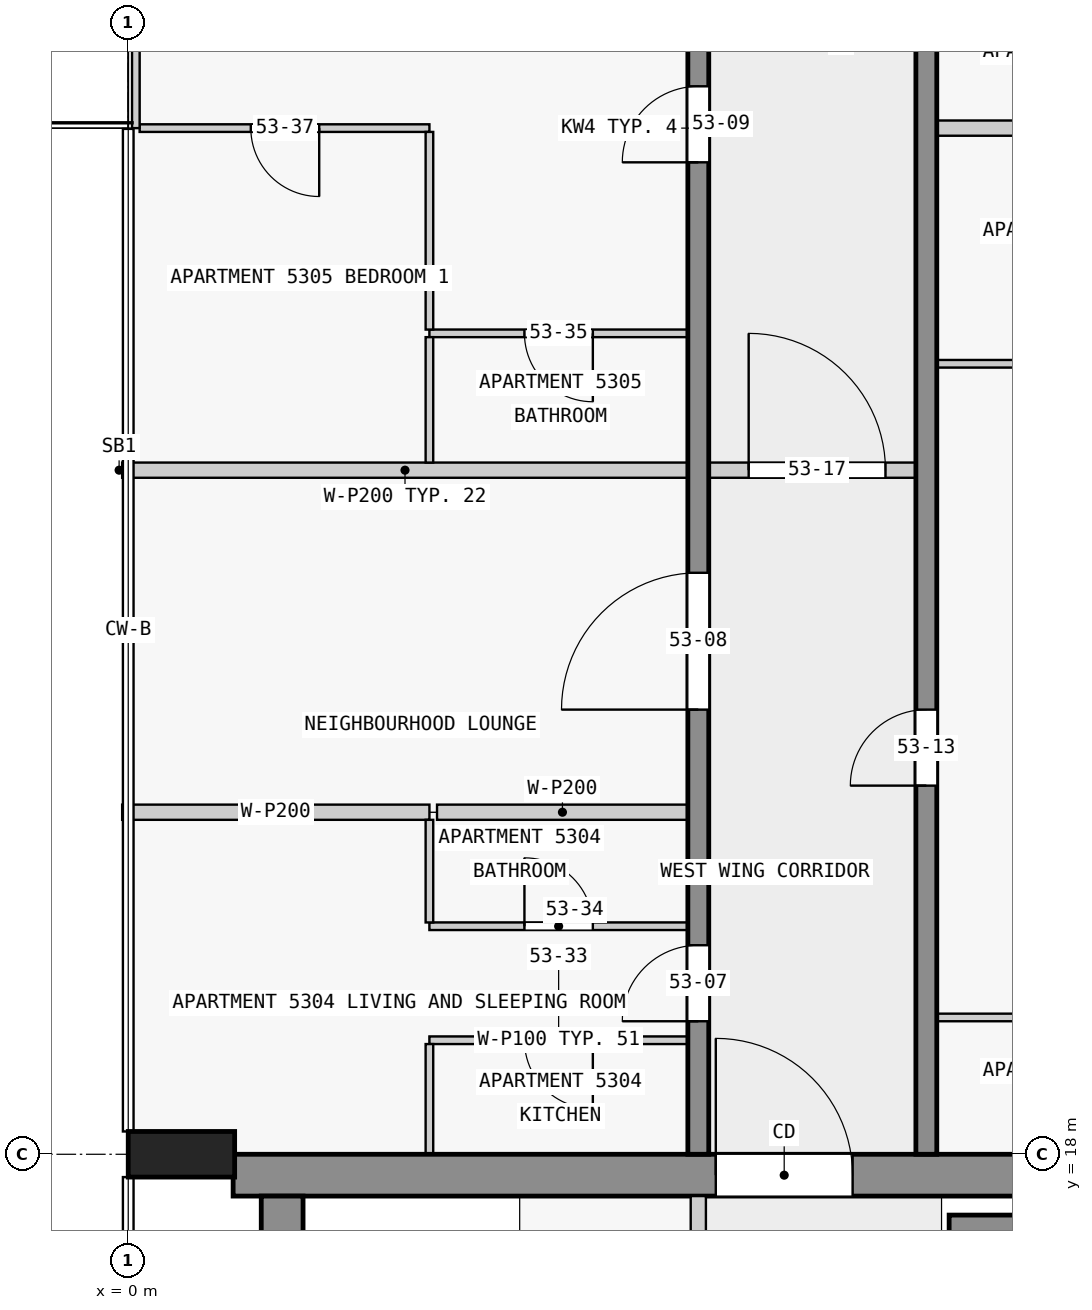
"""IFC4 building model, lengths in metres.
Left out: names, types, materials, properties, quantities, classifications, styles, units other than length and angle.
Written with IfcOpenShell. Run it as: python <this file> out.ifc"""

import sys

from ifc_helpers import new_model, si_unit, direction, frame, frame_2d, origin, origin_2d, place, context, subcontext, project, spatial, rectangle, extrude, element, fill, save


model = new_model("IFC4")
c1 = context("Model", 3, precision=1e-05, world=origin(), true_north=direction((0.0, 1.0)))
c2 = subcontext(c1, "Body", "Model", "MODEL_VIEW")
j1 = project(units=[si_unit("LENGTHUNIT", "METRE"), si_unit("PLANEANGLEUNIT", "RADIAN")], contexts=[c1])
p1 = place(None, origin())
s1 = spatial("IfcSite", under=j1, at=p1, CompositionType="ELEMENT")
p2 = place(p1, origin())
s2 = spatial("IfcBuilding", under=s1, at=p2, CompositionType="ELEMENT")
p3 = place(p2, frame((0.0, 0.0, 204.9)))
s3 = spatial("IfcBuildingStorey", under=s2, at=p3, CompositionType="ELEMENT", Elevation=204.9)
p4 = place(p3, frame((0.7, 18.0, 0.0), z_axis=(0.0, 0.0, 1.0), x_axis=(0.0, 1.0, 0.0)))
e1 = element("IfcColumn", 1, at=p4, inside=s3, PredefinedType="COLUMN", context=c2, shape_type="SweptSolid", body=[
    extrude(rectangle(XDim=0.6, YDim=1.4, at=origin_2d()), origin(), (0.0, 0.0, 1.0), 3.5),
])
p5 = place(p3, frame((1.38, 17.725, 0.0), z_axis=(0.0, 0.0, 1.0), x_axis=(1.0, 0.0, 0.0)))
e2 = element("IfcWall", 2, at=p5, inside=s3, PredefinedType="SHEAR", context=c2, shape_type="SweptSolid", body=[
    extrude(rectangle(XDim=21.12, YDim=0.55, at=frame_2d((10.56, 0.0))), origin(), (0.0, 0.0, 1.0), 3.25),
])
p6 = place(p5, frame((6.35, 0.0, 0.0)))
e3 = element("IfcOpeningElement", 3, at=p6, cuts=e2, PredefinedType="OPENING", context=c2, shape_type="SweptSolid", body=[
    extrude(rectangle(XDim=1.8, YDim=2.1, at=frame_2d((0.9, 1.05))), frame((0.0, 0.285, 0.0), z_axis=(0.0, -1.0, 0.0), x_axis=(1.0, 0.0, 0.0)), (0.0, 0.0, 1.0), 0.57),
])
p7 = place(p3, frame((2.025, 2.5, 0.0), z_axis=(0.0, 0.0, 1.0), x_axis=(0.0, 1.0, 0.0)))
e4 = element("IfcWall", 4, at=p7, inside=s3, PredefinedType="SHEAR", context=c2, shape_type="SweptSolid", body=[
    extrude(rectangle(XDim=14.95, YDim=0.55, at=frame_2d((7.475, 0.0))), origin(), (0.0, 0.0, 1.0), 3.25),
])
p8 = place(p3, frame((10.8, 17.05, 0.0), z_axis=(0.0, 0.0, 1.0), x_axis=(1.0, 0.0, 0.0)))
e5 = element("IfcWall", 5, at=p8, inside=s3, PredefinedType="SHEAR", context=c2, shape_type="SweptSolid", body=[
    extrude(rectangle(XDim=7.8, YDim=0.3, at=frame_2d((3.9, 0.0))), origin(), (0.0, 0.0, 1.0), 3.25),
])
p9 = place(p3, frame((7.5, 18.0, 0.0), z_axis=(0.0, 0.0, 1.0), x_axis=(0.0, 1.0, 0.0)))
e6 = element("IfcWall", 6, at=p9, inside=s3, PredefinedType="SHEAR", context=c2, shape_type="SweptSolid", body=[
    extrude(rectangle(XDim=27.0, YDim=0.275, at=frame_2d((13.5, 0.0))), origin(), (0.0, 0.0, 1.0), 3.25),
])
p10 = place(p9, frame((1.75, 0.0, 0.0)))
e7 = element("IfcOpeningElement", 7, at=p10, cuts=e6, PredefinedType="OPENING", context=c2, shape_type="SweptSolid", body=[
    extrude(rectangle(XDim=1.0, YDim=2.1, at=frame_2d((0.5, 1.05))), frame((0.0, 0.147, 0.0), z_axis=(0.0, -1.0, 0.0), x_axis=(1.0, 0.0, 0.0)), (0.0, 0.0, 1.0), 0.295),
])
p11 = place(p9, frame((5.85, 0.0, 0.0)))
e8 = element("IfcOpeningElement", 8, at=p11, cuts=e6, PredefinedType="OPENING", context=c2, shape_type="SweptSolid", body=[
    extrude(rectangle(XDim=1.8, YDim=2.1, at=frame_2d((0.9, 1.05))), frame((0.0, 0.147, 0.0), z_axis=(0.0, -1.0, 0.0), x_axis=(1.0, 0.0, 0.0)), (0.0, 0.0, 1.0), 0.295),
])
p12 = place(p9, frame((13.05, 0.0, 0.0)))
e9 = element("IfcOpeningElement", 9, at=p12, cuts=e6, PredefinedType="OPENING", context=c2, shape_type="SweptSolid", body=[
    extrude(rectangle(XDim=1.0, YDim=2.1, at=frame_2d((0.5, 1.05))), frame((0.0, 0.147, 0.0), z_axis=(0.0, -1.0, 0.0), x_axis=(1.0, 0.0, 0.0)), (0.0, 0.0, 1.0), 0.295),
])
p13 = place(p9, frame((19.75, 0.0, 0.0)))
e10 = element("IfcOpeningElement", 10, at=p13, cuts=e6, PredefinedType="OPENING", context=c2, shape_type="SweptSolid", body=[
    extrude(rectangle(XDim=1.0, YDim=2.1, at=frame_2d((0.5, 1.05))), frame((0.0, 0.147, 0.0), z_axis=(0.0, -1.0, 0.0), x_axis=(1.0, 0.0, 0.0)), (0.0, 0.0, 1.0), 0.295),
])
p14 = place(p9, frame((23.25, 0.0, 0.0)))
e11 = element("IfcOpeningElement", 11, at=p14, cuts=e6, PredefinedType="OPENING", context=c2, shape_type="SweptSolid", body=[
    extrude(rectangle(XDim=0.9, YDim=2.1, at=frame_2d((0.45, 1.05))), frame((0.0, 0.147, 0.0), z_axis=(0.0, -1.0, 0.0), x_axis=(1.0, 0.0, 0.0)), (0.0, 0.0, 1.0), 0.295),
])
p15 = place(p9, frame((25.45, 0.0, 0.0)))
e12 = element("IfcOpeningElement", 12, at=p15, cuts=e6, PredefinedType="OPENING", context=c2, shape_type="SweptSolid", body=[
    extrude(rectangle(XDim=1.0, YDim=2.1, at=frame_2d((0.5, 1.05))), frame((0.0, 0.147, 0.0), z_axis=(0.0, -1.0, 0.0), x_axis=(1.0, 0.0, 0.0)), (0.0, 0.0, 1.0), 0.295),
])
p16 = place(p3, frame((10.5, 18.0, 0.0), z_axis=(0.0, 0.0, 1.0), x_axis=(0.0, 1.0, 0.0)))
e13 = element("IfcWall", 13, at=p16, inside=s3, PredefinedType="SHEAR", context=c2, shape_type="SweptSolid", body=[
    extrude(rectangle(XDim=27.0, YDim=0.275, at=frame_2d((13.5, 0.0))), origin(), (0.0, 0.0, 1.0), 3.25),
])
p17 = place(p16, frame((4.85, 0.0, 0.0)))
e14 = element("IfcOpeningElement", 14, at=p17, cuts=e13, PredefinedType="OPENING", context=c2, shape_type="SweptSolid", body=[
    extrude(rectangle(XDim=1.0, YDim=2.1, at=frame_2d((0.5, 1.05))), frame((0.0, 0.147, 0.0), z_axis=(0.0, -1.0, 0.0), x_axis=(1.0, 0.0, 0.0)), (0.0, 0.0, 1.0), 0.295),
])
p18 = place(p16, frame((15.25, 0.0, 0.0)))
e15 = element("IfcOpeningElement", 15, at=p18, cuts=e13, PredefinedType="OPENING", context=c2, shape_type="SweptSolid", body=[
    extrude(rectangle(XDim=1.0, YDim=2.1, at=frame_2d((0.5, 1.05))), frame((0.0, 0.147, 0.0), z_axis=(0.0, -1.0, 0.0), x_axis=(1.0, 0.0, 0.0)), (0.0, 0.0, 1.0), 0.295),
])
p19 = place(p16, frame((21.35, 0.0, 0.0)))
e16 = element("IfcOpeningElement", 16, at=p19, cuts=e13, PredefinedType="OPENING", context=c2, shape_type="SweptSolid", body=[
    extrude(rectangle(XDim=1.0, YDim=2.1, at=frame_2d((0.5, 1.05))), frame((0.0, 0.147, 0.0), z_axis=(0.0, -1.0, 0.0), x_axis=(1.0, 0.0, 0.0)), (0.0, 0.0, 1.0), 0.295),
])
p20 = place(p3, frame((0.1, 31.5, 0.0), z_axis=(0.0, 0.0, 1.0), x_axis=(0.0, 1.0, 0.0)))
e17 = element("IfcWall", 17, at=p20, inside=s3, PredefinedType="STANDARD", context=c2, shape_type="SweptSolid", body=[
    extrude(rectangle(XDim=4.5, YDim=0.1, at=frame_2d((2.25, 0.0))), origin(), (0.0, 0.0, 1.0), 3.25),
])
p21 = place(p20, frame((1.05, 0.0, 0.0)))
e18 = element("IfcOpeningElement", 18, at=p21, cuts=e17, PredefinedType="OPENING", context=c2, shape_type="SweptSolid", body=[
    extrude(rectangle(XDim=2.4, YDim=2.4, at=frame_2d((1.2, 1.2))), frame((0.0, 0.06, 0.0), z_axis=(0.0, -1.0, 0.0), x_axis=(1.0, 0.0, 0.0)), (0.0, 0.0, 1.0), 0.12),
])
p22 = place(p3, frame((7.5, 10.1, 0.0), z_axis=(0.0, 0.0, 1.0), x_axis=(0.0, 1.0, 0.0)))
e19 = element("IfcWall", 19, at=p22, inside=s3, PredefinedType="PARTITIONING", context=c2, shape_type="SweptSolid", body=[
    extrude(rectangle(XDim=7.35, YDim=0.2, at=frame_2d((3.675, 0.0))), origin(), (0.0, 0.0, 1.0), 3.25),
])
p23 = place(p22, frame((0.75, 0.0, 0.0)))
e20 = element("IfcOpeningElement", 20, at=p23, cuts=e19, PredefinedType="OPENING", context=c2, shape_type="SweptSolid", body=[
    extrude(rectangle(XDim=0.9, YDim=2.1, at=frame_2d((0.45, 1.05))), frame((0.0, 0.11, 0.0), z_axis=(0.0, -1.0, 0.0), x_axis=(1.0, 0.0, 0.0)), (0.0, 0.0, 1.0), 0.22),
])
p24 = place(p22, frame((4.425, 0.0, 0.0)))
e21 = element("IfcOpeningElement", 21, at=p24, cuts=e19, PredefinedType="OPENING", context=c2, shape_type="SweptSolid", body=[
    extrude(rectangle(XDim=0.9, YDim=2.1, at=frame_2d((0.45, 1.05))), frame((0.0, 0.11, 0.0), z_axis=(0.0, -1.0, 0.0), x_axis=(1.0, 0.0, 0.0)), (0.0, 0.0, 1.0), 0.22),
])
p25 = place(p3, frame((7.363, 19.5, 0.0), z_axis=(0.0, 0.0, 1.0), x_axis=(-1.0, 0.0, 0.0)))
e22 = element("IfcWall", 22, at=p25, inside=s3, PredefinedType="PARTITIONING", context=c2, shape_type="SweptSolid", body=[
    extrude(rectangle(XDim=3.4, YDim=0.1, at=frame_2d((1.7, 0.0))), origin(), (0.0, 0.0, 1.0), 3.25),
])
p26 = place(p25, frame((1.25, 0.0, 0.0)))
e23 = element("IfcOpeningElement", 23, at=p26, cuts=e22, PredefinedType="OPENING", context=c2, shape_type="SweptSolid", body=[
    extrude(rectangle(XDim=0.9, YDim=2.1, at=frame_2d((0.45, 1.05))), frame((0.0, 0.06, 0.0), z_axis=(0.0, -1.0, 0.0), x_axis=(1.0, 0.0, 0.0)), (0.0, 0.0, 1.0), 0.12),
])
p27 = place(p3, frame((14.038, 19.8, 0.0), z_axis=(0.0, 0.0, 1.0), x_axis=(-1.0, 0.0, 0.0)))
e24 = element("IfcWall", 24, at=p27, inside=s3, PredefinedType="PARTITIONING", context=c2, shape_type="SweptSolid", body=[
    extrude(rectangle(XDim=3.4, YDim=0.1, at=frame_2d((1.7, 0.0))), origin(), (0.0, 0.0, 1.0), 3.25),
])
p28 = place(p27, frame((1.25, 0.0, 0.0)))
e25 = element("IfcOpeningElement", 25, at=p28, cuts=e24, PredefinedType="OPENING", context=c2, shape_type="SweptSolid", body=[
    extrude(rectangle(XDim=0.9, YDim=2.1, at=frame_2d((0.45, 1.05))), frame((0.0, 0.06, 0.0), z_axis=(0.0, -1.0, 0.0), x_axis=(1.0, 0.0, 0.0)), (0.0, 0.0, 1.0), 0.12),
])
p29 = place(p3, frame((3.962, 21.0, 0.0), z_axis=(0.0, 0.0, 1.0), x_axis=(1.0, 0.0, 0.0)))
e26 = element("IfcWall", 26, at=p29, inside=s3, PredefinedType="PARTITIONING", context=c2, shape_type="SweptSolid", body=[
    extrude(rectangle(XDim=3.4, YDim=0.1, at=frame_2d((1.7, 0.0))), origin(), (0.0, 0.0, 1.0), 3.25),
])
p30 = place(p29, frame((1.25, 0.0, 0.0)))
e27 = element("IfcOpeningElement", 27, at=p30, cuts=e26, PredefinedType="OPENING", context=c2, shape_type="SweptSolid", body=[
    extrude(rectangle(XDim=0.9, YDim=2.1, at=frame_2d((0.45, 1.05))), frame((0.0, 0.06, 0.0), z_axis=(0.0, -1.0, 0.0), x_axis=(1.0, 0.0, 0.0)), (0.0, 0.0, 1.0), 0.12),
])
p31 = place(p3, frame((7.363, 22.5, 0.0), z_axis=(0.0, 0.0, 1.0), x_axis=(-1.0, 0.0, 0.0)))
e28 = element("IfcWall", 28, at=p31, inside=s3, PredefinedType="PARTITIONING", context=c2, shape_type="SweptSolid", body=[
    extrude(rectangle(XDim=3.3, YDim=0.2, at=frame_2d((1.65, 0.0))), origin(), (0.0, 0.0, 1.0), 3.25),
])
p32 = place(p3, frame((-0.08, 22.5, 0.0), z_axis=(0.0, 0.0, 1.0), x_axis=(1.0, 0.0, 0.0)))
e29 = element("IfcWall", 29, at=p32, inside=s3, PredefinedType="PARTITIONING", context=c2, shape_type="SweptSolid", body=[
    extrude(rectangle(XDim=4.042, YDim=0.2, at=frame_2d((2.021, 0.0))), origin(), (0.0, 0.0, 1.0), 3.25),
])
p33 = place(p3, frame((7.363, 27.0, 0.0), z_axis=(0.0, 0.0, 1.0), x_axis=(-1.0, 0.0, 0.0)))
e30 = element("IfcWall", 30, at=p33, inside=s3, PredefinedType="PARTITIONING", context=c2, shape_type="SweptSolid", body=[
    extrude(rectangle(XDim=7.443, YDim=0.2, at=frame_2d((3.721, 0.0))), origin(), (0.0, 0.0, 1.0), 3.25),
])
p34 = place(p3, frame((10.637, 28.4, 0.0), z_axis=(0.0, 0.0, 1.0), x_axis=(1.0, 0.0, 0.0)))
e31 = element("IfcWall", 31, at=p34, inside=s3, PredefinedType="PARTITIONING", context=c2, shape_type="SweptSolid", body=[
    extrude(rectangle(XDim=3.35, YDim=0.1, at=frame_2d((1.675, 0.0))), origin(), (0.0, 0.0, 1.0), 3.25),
])
p35 = place(p34, frame((1.25, 0.0, 0.0)))
e32 = element("IfcOpeningElement", 32, at=p35, cuts=e31, PredefinedType="OPENING", context=c2, shape_type="SweptSolid", body=[
    extrude(rectangle(XDim=0.9, YDim=2.1, at=frame_2d((0.45, 1.05))), frame((0.0, 0.06, 0.0), z_axis=(0.0, -1.0, 0.0), x_axis=(1.0, 0.0, 0.0)), (0.0, 0.0, 1.0), 0.12),
])
p36 = place(p3, frame((7.363, 28.8, 0.0), z_axis=(0.0, 0.0, 1.0), x_axis=(-1.0, 0.0, 0.0)))
e33 = element("IfcWall", 33, at=p36, inside=s3, PredefinedType="PARTITIONING", context=c2, shape_type="SweptSolid", body=[
    extrude(rectangle(XDim=3.4, YDim=0.1, at=frame_2d((1.7, 0.0))), origin(), (0.0, 0.0, 1.0), 3.25),
])
p37 = place(p36, frame((1.25, 0.0, 0.0)))
e34 = element("IfcOpeningElement", 34, at=p37, cuts=e33, PredefinedType="OPENING", context=c2, shape_type="SweptSolid", body=[
    extrude(rectangle(XDim=0.9, YDim=2.1, at=frame_2d((0.45, 1.05))), frame((0.0, 0.06, 0.0), z_axis=(0.0, -1.0, 0.0), x_axis=(1.0, 0.0, 0.0)), (0.0, 0.0, 1.0), 0.12),
])
p38 = place(p3, frame((3.962, 31.5, 0.0), z_axis=(0.0, 0.0, 1.0), x_axis=(-1.0, 0.0, 0.0)))
e35 = element("IfcWall", 35, at=p38, inside=s3, PredefinedType="PARTITIONING", context=c2, shape_type="SweptSolid", body=[
    extrude(rectangle(XDim=3.812, YDim=0.1, at=frame_2d((1.906, 0.0))), origin(), (0.0, 0.0, 1.0), 3.25),
])
p39 = place(p38, frame((1.45, 0.0, 0.0)))
e36 = element("IfcOpeningElement", 36, at=p39, cuts=e35, PredefinedType="OPENING", context=c2, shape_type="SweptSolid", body=[
    extrude(rectangle(XDim=0.9, YDim=2.1, at=frame_2d((0.45, 1.05))), frame((0.0, 0.06, 0.0), z_axis=(0.0, -1.0, 0.0), x_axis=(1.0, 0.0, 0.0)), (0.0, 0.0, 1.0), 0.12),
])
p40 = place(p3, frame((17.85, 31.5, 0.0), z_axis=(0.0, 0.0, 1.0), x_axis=(-1.0, 0.0, 0.0)))
e37 = element("IfcWall", 37, at=p40, inside=s3, PredefinedType="PARTITIONING", context=c2, shape_type="SweptSolid", body=[
    extrude(rectangle(XDim=7.213, YDim=0.2, at=frame_2d((3.606, 0.0))), origin(), (0.0, 0.0, 1.0), 3.25),
])
p41 = place(p3, frame((3.962, 19.45, 0.0), z_axis=(0.0, 0.0, 1.0), x_axis=(0.0, -1.0, 0.0)))
e38 = element("IfcWall", 38, at=p41, inside=s3, PredefinedType="PARTITIONING", context=c2, shape_type="SweptSolid", body=[
    extrude(rectangle(XDim=1.45, YDim=0.1, at=frame_2d((0.725, 0.0))), origin(), (0.0, 0.0, 1.0), 3.25),
])
p42 = place(p3, frame((3.962, 22.4, 0.0), z_axis=(0.0, 0.0, 1.0), x_axis=(0.0, -1.0, 0.0)))
e39 = element("IfcWall", 39, at=p42, inside=s3, PredefinedType="PARTITIONING", context=c2, shape_type="SweptSolid", body=[
    extrude(rectangle(XDim=1.35, YDim=0.1, at=frame_2d((0.675, 0.0))), origin(), (0.0, 0.0, 1.0), 3.25),
])
p43 = place(p3, frame((3.962, 28.75, 0.0), z_axis=(0.0, 0.0, 1.0), x_axis=(0.0, -1.0, 0.0)))
e40 = element("IfcWall", 40, at=p43, inside=s3, PredefinedType="PARTITIONING", context=c2, shape_type="SweptSolid", body=[
    extrude(rectangle(XDim=1.65, YDim=0.1, at=frame_2d((0.825, 0.0))), origin(), (0.0, 0.0, 1.0), 3.25),
])
p44 = place(p3, frame((3.962, 28.85, 0.0), z_axis=(0.0, 0.0, 1.0), x_axis=(0.0, 1.0, 0.0)))
e41 = element("IfcWall", 41, at=p44, inside=s3, PredefinedType="PARTITIONING", context=c2, shape_type="SweptSolid", body=[
    extrude(rectangle(XDim=2.6, YDim=0.1, at=frame_2d((1.3, 0.0))), origin(), (0.0, 0.0, 1.0), 3.25),
])
p45 = place(p3, frame((7.462, 27.0, 0.0), z_axis=(0.0, 0.0, 1.0), x_axis=(1.0, 0.0, 0.0)))
e42 = element("IfcWall", 42, at=p45, inside=s3, PredefinedType="PARTITIONING", context=c2, shape_type="SweptSolid", body=[
    extrude(rectangle(XDim=3.175, YDim=0.2, at=frame_2d((1.587, 0.0))), origin(), (0.0, 0.0, 1.0), 3.25),
])
p46 = place(p45, frame((0.7, 0.0, 0.0)))
e43 = element("IfcOpeningElement", 43, at=p46, cuts=e42, PredefinedType="OPENING", context=c2, shape_type="SweptSolid", body=[
    extrude(rectangle(XDim=1.8, YDim=2.1, at=frame_2d((0.9, 1.05))), frame((0.0, 0.11, 0.0), z_axis=(0.0, -1.0, 0.0), x_axis=(1.0, 0.0, 0.0)), (0.0, 0.0, 1.0), 0.22),
])
p47 = place(p6, origin())
e44 = element("IfcDoor", 44, at=p47, inside=s3, OperationType="DOUBLE_DOOR_SINGLE_SWING", PredefinedType="DOOR", context=c2, shape_type="SweptSolid", body=[
    extrude(rectangle(XDim=1.8, YDim=2.1, at=frame_2d((0.9, 1.05))), frame((0.0, 0.025, 0.0), z_axis=(0.0, -1.0, 0.0), x_axis=(1.0, 0.0, 0.0)), (0.0, 0.0, 1.0), 0.05),
])
fill(e3, e44)
p48 = place(p10, origin())
e45 = element("IfcDoor", 45, at=p48, inside=s3, OperationType="SINGLE_SWING_LEFT", PredefinedType="DOOR", context=c2, shape_type="SweptSolid", body=[
    extrude(rectangle(XDim=1.0, YDim=2.1, at=frame_2d((0.5, 1.05))), frame((0.0, 0.025, 0.0), z_axis=(0.0, -1.0, 0.0), x_axis=(1.0, 0.0, 0.0)), (0.0, 0.0, 1.0), 0.05),
])
fill(e7, e45)
p49 = place(p11, origin())
e46 = element("IfcDoor", 46, at=p49, inside=s3, OperationType="SINGLE_SWING_LEFT", PredefinedType="DOOR", context=c2, shape_type="SweptSolid", body=[
    extrude(rectangle(XDim=1.8, YDim=2.1, at=frame_2d((0.9, 1.05))), frame((0.0, 0.025, 0.0), z_axis=(0.0, -1.0, 0.0), x_axis=(1.0, 0.0, 0.0)), (0.0, 0.0, 1.0), 0.05),
])
fill(e8, e46)
p50 = place(p12, origin())
e47 = element("IfcDoor", 47, at=p50, inside=s3, OperationType="SINGLE_SWING_RIGHT", PredefinedType="DOOR", context=c2, shape_type="SweptSolid", body=[
    extrude(rectangle(XDim=1.0, YDim=2.1, at=frame_2d((0.5, 1.05))), frame((0.0, 0.025, 0.0), z_axis=(0.0, -1.0, 0.0), x_axis=(1.0, 0.0, 0.0)), (0.0, 0.0, 1.0), 0.05),
])
fill(e9, e47)
p51 = place(p17, origin())
e48 = element("IfcDoor", 48, at=p51, inside=s3, OperationType="SINGLE_SWING_LEFT", PredefinedType="DOOR", context=c2, shape_type="SweptSolid", body=[
    extrude(rectangle(XDim=1.0, YDim=2.1, at=frame_2d((0.5, 1.05))), frame((0.0, 0.025, 0.0), z_axis=(0.0, -1.0, 0.0), x_axis=(1.0, 0.0, 0.0)), (0.0, 0.0, 1.0), 0.05),
])
fill(e14, e48)
p52 = place(p46, origin())
e49 = element("IfcDoor", 49, at=p52, inside=s3, OperationType="SINGLE_SWING_RIGHT", PredefinedType="DOOR", context=c2, shape_type="SweptSolid", body=[
    extrude(rectangle(XDim=1.8, YDim=2.1, at=frame_2d((0.9, 1.05))), frame((0.0, 0.025, 0.0), z_axis=(0.0, -1.0, 0.0), x_axis=(1.0, 0.0, 0.0)), (0.0, 0.0, 1.0), 0.05),
])
fill(e43, e49)
p53 = place(p26, origin())
e50 = element("IfcDoor", 50, at=p53, inside=s3, OperationType="SINGLE_SWING_LEFT", PredefinedType="DOOR", context=c2, shape_type="SweptSolid", body=[
    extrude(rectangle(XDim=0.9, YDim=2.1, at=frame_2d((0.45, 1.05))), frame((0.0, 0.025, 0.0), z_axis=(0.0, -1.0, 0.0), x_axis=(1.0, 0.0, 0.0)), (0.0, 0.0, 1.0), 0.05),
])
fill(e23, e50)
p54 = place(p30, origin())
e51 = element("IfcDoor", 51, at=p54, inside=s3, OperationType="SINGLE_SWING_LEFT", PredefinedType="DOOR", context=c2, shape_type="SweptSolid", body=[
    extrude(rectangle(XDim=0.9, YDim=2.1, at=frame_2d((0.45, 1.05))), frame((0.0, 0.025, 0.0), z_axis=(0.0, -1.0, 0.0), x_axis=(1.0, 0.0, 0.0)), (0.0, 0.0, 1.0), 0.05),
])
fill(e27, e51)
p55 = place(p37, origin())
e52 = element("IfcDoor", 52, at=p55, inside=s3, OperationType="SINGLE_SWING_LEFT", PredefinedType="DOOR", context=c2, shape_type="SweptSolid", body=[
    extrude(rectangle(XDim=0.9, YDim=2.1, at=frame_2d((0.45, 1.05))), frame((0.0, 0.025, 0.0), z_axis=(0.0, -1.0, 0.0), x_axis=(1.0, 0.0, 0.0)), (0.0, 0.0, 1.0), 0.05),
])
fill(e34, e52)
p56 = place(p39, origin())
e53 = element("IfcDoor", 53, at=p56, inside=s3, OperationType="SINGLE_SWING_LEFT", PredefinedType="DOOR", context=c2, shape_type="SweptSolid", body=[
    extrude(rectangle(XDim=0.9, YDim=2.1, at=frame_2d((0.45, 1.05))), frame((0.0, 0.025, 0.0), z_axis=(0.0, -1.0, 0.0), x_axis=(1.0, 0.0, 0.0)), (0.0, 0.0, 1.0), 0.05),
])
fill(e36, e53)
save(model, sys.argv[1])
